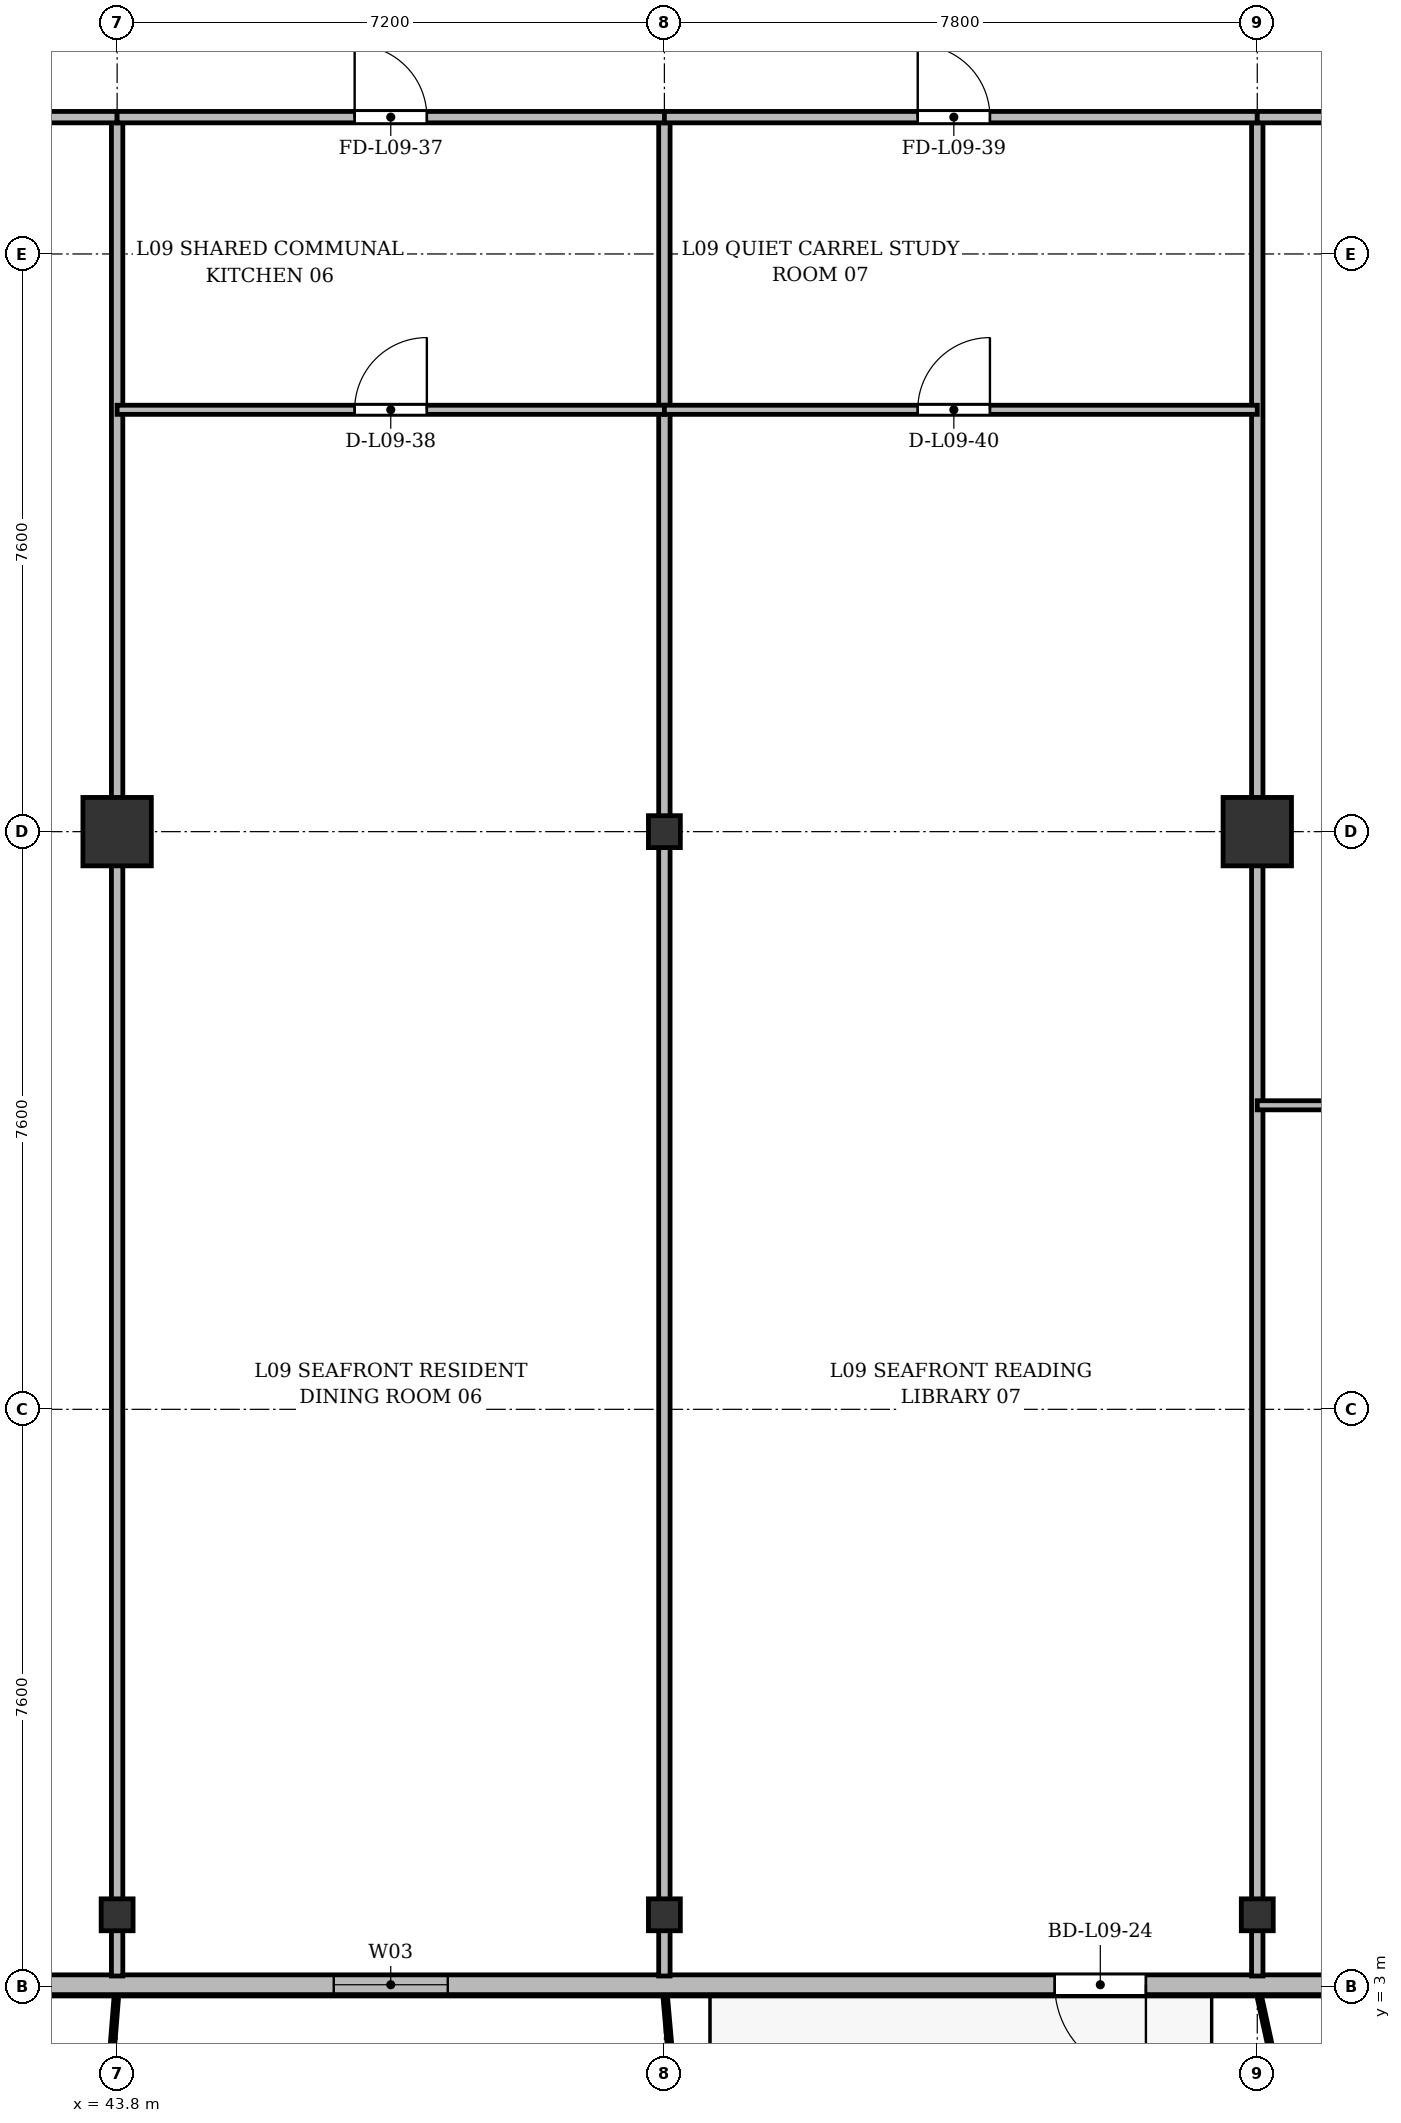
"""IFC4 building model, lengths in metres.
Left out: names, types, materials, properties, quantities, classifications, styles, units other than length and angle.
Written with IfcOpenShell. Run it as: python <this file> out.ifc"""

import sys

from ifc_helpers import new_model, si_unit, direction, frame, frame_2d, origin, origin_2d, place, context, subcontext, project, spatial, rectangle, i_section, extrude, source, transform, mapped, element, fill, save


model = new_model("IFC4")
c1 = context("Model", 3, precision=1e-05, world=origin(), true_north=direction((0.0, 1.0)))
c2 = subcontext(c1, "Body", "Model", "MODEL_VIEW")
j1 = project(units=[si_unit("LENGTHUNIT", "METRE"), si_unit("PLANEANGLEUNIT", "RADIAN")], contexts=[c1])
p1 = place(None, origin())
s1 = spatial("IfcSite", under=j1, at=p1, CompositionType="ELEMENT")
p2 = place(p1, origin())
s2 = spatial("IfcBuilding", under=s1, at=p2, CompositionType="ELEMENT")
p3 = place(p2, frame((0.0, 0.0, 37.9)))
s3 = spatial("IfcBuildingStorey", under=s2, at=p3, CompositionType="ELEMENT", Elevation=37.9)
m1 = source(origin(), c2, "Body", "SweptSolid", [
    extrude(i_section(OverallWidth=0.42, OverallDepth=0.42, WebThickness=0.026, FlangeThickness=0.04, at=origin_2d()), origin(), (0.0, 0.0, 1.0), 3.6),
])
p4 = place(p3, frame((43.8, 3.95, 0.0), z_axis=(0.0, 0.0, 1.0), x_axis=(1.0, 0.0, 0.0)))
e1 = element("IfcColumn", 1, at=p4, inside=s3, PredefinedType="COLUMN", context=c2, shape_type="MappedRepresentation", body=[
    mapped(m1, transform((0.0, 0.0, 0.0), x_axis=(1.0, 0.0, 0.0), y_axis=(0.0, 1.0, 0.0), z_axis=(0.0, 0.0, 1.0), scale=1.0)),
])
m2 = source(origin(), c2, "Body", "SweptSolid", [
    extrude(rectangle(XDim=0.9, YDim=0.9, at=origin_2d()), origin(), (0.0, 0.0, 1.0), 3.6),
])
p5 = place(p3, frame((43.8, 18.2, 0.0), z_axis=(0.0, 0.0, 1.0), x_axis=(1.0, 0.0, 0.0)))
e2 = element("IfcColumn", 2, at=p5, inside=s3, PredefinedType="COLUMN", context=c2, shape_type="MappedRepresentation", body=[
    mapped(m2, transform((0.0, 0.0, 0.0), x_axis=(1.0, 0.0, 0.0), y_axis=(0.0, 1.0, 0.0), z_axis=(0.0, 0.0, 1.0), scale=1.0)),
])
for number, where, z_axis, x_axis in (
    (3, (51.0, 3.95, 0.0), (0.0, 0.0, 1.0), (1.0, 0.0, 0.0)),
    (4, (51.0, 18.2, 0.0), (0.0, 0.0, 1.0), (1.0, 0.0, 0.0)),
    (5, (58.8, 3.95, 0.0), (0.0, 0.0, 1.0), (1.0, 0.0, 0.0)),
):
    element("IfcColumn", number, at=place(p3, frame(where, z_axis=z_axis, x_axis=x_axis)), inside=s3, PredefinedType="COLUMN", context=c2, shape_type="MappedRepresentation", body=[
        mapped(m1, transform((0.0, 0.0, 0.0), x_axis=(1.0, 0.0, 0.0), y_axis=(0.0, 1.0, 0.0), z_axis=(0.0, 0.0, 1.0), scale=1.0)),
    ])
p6 = place(p3, frame((58.8, 18.2, 0.0), z_axis=(0.0, 0.0, 1.0), x_axis=(1.0, 0.0, 0.0)))
e6 = element("IfcColumn", 6, at=p6, inside=s3, PredefinedType="COLUMN", context=c2, shape_type="MappedRepresentation", body=[
    mapped(m2, transform((0.0, 0.0, 0.0), x_axis=(1.0, 0.0, 0.0), y_axis=(0.0, 1.0, 0.0), z_axis=(0.0, 0.0, 1.0), scale=1.0)),
])
p7 = place(p3, frame((66.9, 3.03, 0.0), z_axis=(0.0, 0.0, 1.0), x_axis=(-1.0, 0.0, 0.0)))
e7 = element("IfcWall", 7, at=p7, inside=s3, PredefinedType="SOLIDWALL", context=c2, shape_type="SweptSolid", body=[
    extrude(rectangle(XDim=59.4, YDim=0.26, at=frame_2d((29.7, 0.0))), origin(), (0.0, 0.0, 1.0), 3.34),
])
p8 = place(p7, frame((3.8, 0.0, 0.9)))
e8 = element("IfcOpeningElement", 8, at=p8, cuts=e7, PredefinedType="OPENING", context=c2, shape_type="SweptSolid", body=[
    extrude(rectangle(XDim=1.8, YDim=1.8, at=frame_2d((0.9, 0.9))), frame((0.0, 0.14, 0.0), z_axis=(0.0, -1.0, 0.0), x_axis=(1.0, 0.0, 0.0)), (0.0, 0.0, 1.0), 0.28),
])
p9 = place(p7, frame((9.565, 0.0, 0.0)))
e9 = element("IfcOpeningElement", 9, at=p9, cuts=e7, PredefinedType="OPENING", context=c2, shape_type="SweptSolid", body=[
    extrude(rectangle(XDim=1.2, YDim=2.2, at=frame_2d((0.6, 1.1))), frame((0.0, 0.14, 0.0), z_axis=(0.0, -1.0, 0.0), x_axis=(1.0, 0.0, 0.0)), (0.0, 0.0, 1.0), 0.28),
])
p10 = place(p7, frame((18.75, 0.0, 0.9)))
e10 = element("IfcOpeningElement", 10, at=p10, cuts=e7, PredefinedType="OPENING", context=c2, shape_type="SweptSolid", body=[
    extrude(rectangle(XDim=1.5, YDim=1.75, at=frame_2d((0.75, 0.875))), frame((0.0, 0.14, 0.0), z_axis=(0.0, -1.0, 0.0), x_axis=(1.0, 0.0, 0.0)), (0.0, 0.0, 1.0), 0.28),
])
p11 = place(p7, frame((28.7, 0.0, 0.9)))
e11 = element("IfcOpeningElement", 11, at=p11, cuts=e7, PredefinedType="OPENING", context=c2, shape_type="SweptSolid", body=[
    extrude(rectangle(XDim=2.0, YDim=1.95, at=frame_2d((1.0, 0.975))), frame((0.0, 0.14, 0.0), z_axis=(0.0, -1.0, 0.0), x_axis=(1.0, 0.0, 0.0)), (0.0, 0.0, 1.0), 0.28),
])
p12 = place(p7, frame((40.301, 0.0, 0.0)))
e12 = element("IfcOpeningElement", 12, at=p12, cuts=e7, PredefinedType="OPENING", context=c2, shape_type="SweptSolid", body=[
    extrude(rectangle(XDim=1.2, YDim=2.2, at=frame_2d((0.6, 1.1))), frame((0.0, 0.14, 0.0), z_axis=(0.0, -1.0, 0.0), x_axis=(1.0, 0.0, 0.0)), (0.0, 0.0, 1.0), 0.28),
])
p13 = place(p7, frame((46.5, 0.0, 0.9)))
e13 = element("IfcOpeningElement", 13, at=p13, cuts=e7, PredefinedType="OPENING", context=c2, shape_type="SweptSolid", body=[
    extrude(rectangle(XDim=1.8, YDim=1.8, at=frame_2d((0.9, 0.9))), frame((0.0, 0.14, 0.0), z_axis=(0.0, -1.0, 0.0), x_axis=(1.0, 0.0, 0.0)), (0.0, 0.0, 1.0), 0.28),
])
p14 = place(p7, frame((55.817, 0.0, 0.0)))
e14 = element("IfcOpeningElement", 14, at=p14, cuts=e7, PredefinedType="OPENING", context=c2, shape_type="SweptSolid", body=[
    extrude(rectangle(XDim=1.2, YDim=2.2, at=frame_2d((0.6, 1.1))), frame((0.0, 0.14, 0.0), z_axis=(0.0, -1.0, 0.0), x_axis=(1.0, 0.0, 0.0)), (0.0, 0.0, 1.0), 0.28),
])
for number, where, z_axis, x_axis in (
    (15, (43.8, 3.145, 0.0), (0.0, 0.0, 1.0), (0.0, 1.0, 0.0)),
    (16, (51.0, 3.145, 0.0), (0.0, 0.0, 1.0), (0.0, 1.0, 0.0)),
    (17, (58.8, 3.145, 0.0), (0.0, 0.0, 1.0), (0.0, 1.0, 0.0)),
):
    element("IfcWall", number, at=place(p3, frame(where, z_axis=z_axis, x_axis=x_axis)), inside=s3, PredefinedType="PARTITIONING", context=c2, shape_type="SweptSolid", body=[
        extrude(rectangle(XDim=24.455, YDim=0.15, at=frame_2d((12.228, 0.0))), origin(), (0.0, 0.0, 1.0), 2.752),
    ])
p15 = place(p3, frame((30.6, 27.6, 0.0), z_axis=(0.0, 0.0, 1.0), x_axis=(1.0, 0.0, 0.0)))
e18 = element("IfcWall", 18, at=p15, inside=s3, PredefinedType="PARTITIONING", context=c2, shape_type="SweptSolid", body=[
    extrude(rectangle(XDim=13.2, YDim=0.15, at=frame_2d((6.6, 0.0))), origin(), (0.0, 0.0, 1.0), 2.752),
])
p16 = place(p15, frame((5.8, 0.0, 0.0)))
e19 = element("IfcOpeningElement", 19, at=p16, cuts=e18, PredefinedType="OPENING", context=c2, shape_type="SweptSolid", body=[
    extrude(rectangle(XDim=1.6, YDim=2.2, at=frame_2d((0.8, 1.1))), frame((0.0, 0.085, 0.0), z_axis=(0.0, -1.0, 0.0), x_axis=(1.0, 0.0, 0.0)), (0.0, 0.0, 1.0), 0.17),
])
p17 = place(p3, frame((43.8, 27.6, 0.0), z_axis=(0.0, 0.0, 1.0), x_axis=(1.0, 0.0, 0.0)))
e20 = element("IfcWall", 20, at=p17, inside=s3, PredefinedType="PARTITIONING", context=c2, shape_type="SweptSolid", body=[
    extrude(rectangle(XDim=7.2, YDim=0.15, at=frame_2d((3.6, 0.0))), origin(), (0.0, 0.0, 1.0), 2.752),
])
p18 = place(p17, frame((3.125, 0.0, 0.0)))
e21 = element("IfcOpeningElement", 21, at=p18, cuts=e20, PredefinedType="OPENING", context=c2, shape_type="SweptSolid", body=[
    extrude(rectangle(XDim=0.95, YDim=2.15, at=frame_2d((0.475, 1.075))), frame((0.0, 0.085, 0.0), z_axis=(0.0, -1.0, 0.0), x_axis=(1.0, 0.0, 0.0)), (0.0, 0.0, 1.0), 0.17),
])
p19 = place(p3, frame((43.8, 23.75, 0.0), z_axis=(0.0, 0.0, 1.0), x_axis=(1.0, 0.0, 0.0)))
e22 = element("IfcWall", 22, at=p19, inside=s3, PredefinedType="PARTITIONING", context=c2, shape_type="SweptSolid", body=[
    extrude(rectangle(XDim=7.2, YDim=0.12, at=frame_2d((3.6, 0.0))), origin(), (0.0, 0.0, 1.0), 2.752),
])
p20 = place(p19, frame((3.125, 0.0, 0.0)))
e23 = element("IfcOpeningElement", 23, at=p20, cuts=e22, PredefinedType="OPENING", context=c2, shape_type="SweptSolid", body=[
    extrude(rectangle(XDim=0.95, YDim=2.15, at=frame_2d((0.475, 1.075))), frame((0.0, 0.07, 0.0), z_axis=(0.0, -1.0, 0.0), x_axis=(1.0, 0.0, 0.0)), (0.0, 0.0, 1.0), 0.14),
])
p21 = place(p3, frame((51.0, 27.6, 0.0), z_axis=(0.0, 0.0, 1.0), x_axis=(1.0, 0.0, 0.0)))
e24 = element("IfcWall", 24, at=p21, inside=s3, PredefinedType="PARTITIONING", context=c2, shape_type="SweptSolid", body=[
    extrude(rectangle(XDim=7.8, YDim=0.15, at=frame_2d((3.9, 0.0))), origin(), (0.0, 0.0, 1.0), 2.752),
])
p22 = place(p21, frame((3.333, 0.0, 0.0)))
e25 = element("IfcOpeningElement", 25, at=p22, cuts=e24, PredefinedType="OPENING", context=c2, shape_type="SweptSolid", body=[
    extrude(rectangle(XDim=0.95, YDim=2.15, at=frame_2d((0.475, 1.075))), frame((0.0, 0.085, 0.0), z_axis=(0.0, -1.0, 0.0), x_axis=(1.0, 0.0, 0.0)), (0.0, 0.0, 1.0), 0.17),
])
p23 = place(p3, frame((51.0, 23.75, 0.0), z_axis=(0.0, 0.0, 1.0), x_axis=(1.0, 0.0, 0.0)))
e26 = element("IfcWall", 26, at=p23, inside=s3, PredefinedType="PARTITIONING", context=c2, shape_type="SweptSolid", body=[
    extrude(rectangle(XDim=7.8, YDim=0.12, at=frame_2d((3.9, 0.0))), origin(), (0.0, 0.0, 1.0), 2.752),
])
p24 = place(p23, frame((3.333, 0.0, 0.0)))
e27 = element("IfcOpeningElement", 27, at=p24, cuts=e26, PredefinedType="OPENING", context=c2, shape_type="SweptSolid", body=[
    extrude(rectangle(XDim=0.95, YDim=2.15, at=frame_2d((0.475, 1.075))), frame((0.0, 0.07, 0.0), z_axis=(0.0, -1.0, 0.0), x_axis=(1.0, 0.0, 0.0)), (0.0, 0.0, 1.0), 0.14),
])
p25 = place(p3, frame((58.8, 27.6, 0.0), z_axis=(0.0, 0.0, 1.0), x_axis=(1.0, 0.0, 0.0)))
e28 = element("IfcWall", 28, at=p25, inside=s3, PredefinedType="PARTITIONING", context=c2, shape_type="SweptSolid", body=[
    extrude(rectangle(XDim=6.8, YDim=0.15, at=frame_2d((3.4, 0.0))), origin(), (0.0, 0.0, 1.0), 2.752),
])
p26 = place(p25, frame((2.925, 0.0, 0.0)))
e29 = element("IfcOpeningElement", 29, at=p26, cuts=e28, PredefinedType="OPENING", context=c2, shape_type="SweptSolid", body=[
    extrude(rectangle(XDim=0.95, YDim=2.15, at=frame_2d((0.475, 1.075))), frame((0.0, 0.085, 0.0), z_axis=(0.0, -1.0, 0.0), x_axis=(1.0, 0.0, 0.0)), (0.0, 0.0, 1.0), 0.17),
])
p27 = place(p3, frame((58.8, 14.6, 0.0), z_axis=(0.0, 0.0, 1.0), x_axis=(1.0, 0.0, 0.0)))
e30 = element("IfcWall", 30, at=p27, inside=s3, PredefinedType="PARTITIONING", context=c2, shape_type="SweptSolid", body=[
    extrude(rectangle(XDim=6.8, YDim=0.12, at=frame_2d((3.4, 0.0))), origin(), (0.0, 0.0, 1.0), 2.752),
])
p28 = place(p27, frame((2.925, 0.0, 0.0)))
e31 = element("IfcOpeningElement", 31, at=p28, cuts=e30, PredefinedType="OPENING", context=c2, shape_type="SweptSolid", body=[
    extrude(rectangle(XDim=0.95, YDim=2.15, at=frame_2d((0.475, 1.075))), frame((0.0, 0.07, 0.0), z_axis=(0.0, -1.0, 0.0), x_axis=(1.0, 0.0, 0.0)), (0.0, 0.0, 1.0), 0.14),
])
m3 = source(origin(), c2, "Body", "SweptSolid", [
    extrude(rectangle(XDim=1.2, YDim=2.2, at=frame_2d((0.6, 1.1))), frame((0.0, 0.025, 0.0), z_axis=(0.0, -1.0, 0.0), x_axis=(1.0, 0.0, 0.0)), (0.0, 0.0, 1.0), 0.05),
])
p29 = place(p9, origin())
e32 = element("IfcDoor", 32, at=p29, inside=s3, OperationType="SINGLE_SWING_LEFT", PredefinedType="DOOR", context=c2, shape_type="MappedRepresentation", body=[
    mapped(m3, transform((0.0, 0.0, 0.0), x_axis=(1.0, 0.0, 0.0), y_axis=(0.0, 1.0, 0.0), z_axis=(0.0, 0.0, 1.0), scale=1.0)),
])
fill(e9, e32)
m4 = source(origin(), c2, "Body", "SweptSolid", [
    extrude(rectangle(XDim=1.5, YDim=1.75, at=frame_2d((0.75, 0.875))), frame((0.0, 0.03, 0.0), z_axis=(0.0, -1.0, 0.0), x_axis=(1.0, 0.0, 0.0)), (0.0, 0.0, 1.0), 0.06),
])
p30 = place(p10, origin())
e33 = element("IfcWindow", 33, at=p30, inside=s3, PartitioningType="SINGLE_PANEL", PredefinedType="WINDOW", context=c2, shape_type="MappedRepresentation", body=[
    mapped(m4, transform((0.0, 0.0, 0.0), x_axis=(1.0, 0.0, 0.0), y_axis=(0.0, 1.0, 0.0), z_axis=(0.0, 0.0, 1.0), scale=1.0)),
])
fill(e10, e33)
m5 = source(origin(), c2, "Body", "SweptSolid", [
    extrude(rectangle(XDim=0.95, YDim=2.15, at=frame_2d((0.475, 1.075))), frame((0.0, 0.025, 0.0), z_axis=(0.0, -1.0, 0.0), x_axis=(1.0, 0.0, 0.0)), (0.0, 0.0, 1.0), 0.05),
])
p31 = place(p18, origin())
e34 = element("IfcDoor", 34, at=p31, inside=s3, OperationType="SINGLE_SWING_LEFT", PredefinedType="DOOR", context=c2, shape_type="MappedRepresentation", body=[
    mapped(m5, transform((0.0, 0.0, 0.0), x_axis=(1.0, 0.0, 0.0), y_axis=(0.0, 1.0, 0.0), z_axis=(0.0, 0.0, 1.0), scale=1.0)),
])
fill(e21, e34)
p32 = place(p20, origin())
e35 = element("IfcDoor", 35, at=p32, inside=s3, OperationType="SINGLE_SWING_RIGHT", PredefinedType="DOOR", context=c2, shape_type="MappedRepresentation", body=[
    mapped(m5, transform((0.0, 0.0, 0.0), x_axis=(1.0, 0.0, 0.0), y_axis=(0.0, 1.0, 0.0), z_axis=(0.0, 0.0, 1.0), scale=1.0)),
])
fill(e23, e35)
p33 = place(p22, origin())
e36 = element("IfcDoor", 36, at=p33, inside=s3, OperationType="SINGLE_SWING_LEFT", PredefinedType="DOOR", context=c2, shape_type="MappedRepresentation", body=[
    mapped(m5, transform((0.0, 0.0, 0.0), x_axis=(1.0, 0.0, 0.0), y_axis=(0.0, 1.0, 0.0), z_axis=(0.0, 0.0, 1.0), scale=1.0)),
])
fill(e25, e36)
p34 = place(p24, origin())
e37 = element("IfcDoor", 37, at=p34, inside=s3, OperationType="SINGLE_SWING_RIGHT", PredefinedType="DOOR", context=c2, shape_type="MappedRepresentation", body=[
    mapped(m5, transform((0.0, 0.0, 0.0), x_axis=(1.0, 0.0, 0.0), y_axis=(0.0, 1.0, 0.0), z_axis=(0.0, 0.0, 1.0), scale=1.0)),
])
fill(e27, e37)
save(model, sys.argv[1])
